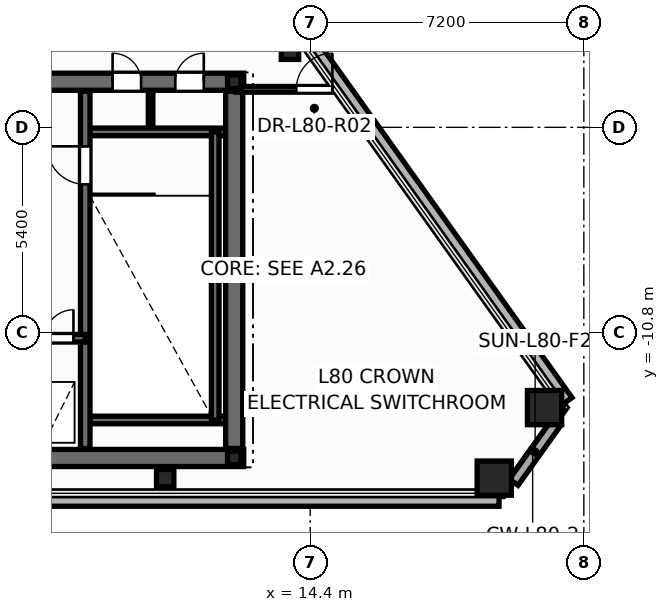
"""IFC4 building model, lengths in metres.
Left out: names, types, materials, properties, quantities, classifications, styles, units other than length and angle.
Written with IfcOpenShell. Run it as: python <this file> out.ifc"""

import sys

from ifc_helpers import new_model, si_unit, direction, frame, frame_2d, origin, origin_2d, place, context, subcontext, project, spatial, rectangle, hollow_rectangle, hollow_circle, i_section, extrude, element, fill, save


model = new_model("IFC4")
c1 = context("Model", 3, precision=1e-05, world=origin(), true_north=direction((0.0, 1.0)))
c2 = subcontext(c1, "Body", "Model", "MODEL_VIEW")
j1 = project(units=[si_unit("LENGTHUNIT", "METRE"), si_unit("PLANEANGLEUNIT", "RADIAN")], contexts=[c1])
p1 = place(None, origin())
s1 = spatial("IfcSite", under=j1, at=p1, CompositionType="ELEMENT")
p2 = place(p1, origin())
s2 = spatial("IfcBuilding", under=s1, at=p2, CompositionType="ELEMENT")
p3 = place(p2, frame((0.0, 0.0, 306.0)))
s3 = spatial("IfcBuildingStorey", under=s2, at=p3, CompositionType="ELEMENT", Elevation=306.0)
p4 = place(p3, frame((19.243, -14.63, 0.0), z_axis=(0.0, 0.0, 1.0), x_axis=(1.0, 0.0, 0.0)))
e1 = element("IfcColumn", 1, at=p4, inside=s3, PredefinedType="COLUMN", context=c2, shape_type="SweptSolid", body=[
    extrude(hollow_rectangle(XDim=0.9, YDim=0.9, WallThickness=0.04, at=origin_2d()), origin(), (0.0, 0.0, 1.0), 3.396),
])
p5 = place(p3, frame((20.567, -12.775, 0.0), z_axis=(0.0, 0.0, 1.0), x_axis=(1.0, 0.0, 0.0)))
e2 = element("IfcColumn", 2, at=p5, inside=s3, PredefinedType="COLUMN", context=c2, shape_type="SweptSolid", body=[
    extrude(hollow_rectangle(XDim=0.9, YDim=0.9, WallThickness=0.04, at=origin_2d()), origin(), (0.0, 0.0, 1.0), 4.2),
])
p6 = place(p3, frame((10.583, -14.63, 0.0), z_axis=(0.0, 0.0, 1.0), x_axis=(1.0, 0.0, 0.0)))
e3 = element("IfcColumn", 3, at=p6, inside=s3, PredefinedType="COLUMN", context=c2, shape_type="SweptSolid", body=[
    extrude(hollow_circle(Radius=0.229, WallThickness=0.016, at=origin_2d()), origin(), (0.0, 0.0, 1.0), 3.396),
])
p7 = place(p3, frame((13.868, -3.385, 0.0), z_axis=(0.0, 0.0, 1.0), x_axis=(1.0, 0.0, 0.0)))
e4 = element("IfcColumn", 4, at=p7, inside=s3, PredefinedType="COLUMN", context=c2, shape_type="SweptSolid", body=[
    extrude(hollow_circle(Radius=0.229, WallThickness=0.016, at=origin_2d()), origin(), (0.0, 0.0, 1.0), 4.2),
])
p8 = place(p3, frame((12.4, -14.1, 0.0), z_axis=(0.0, 0.0, 1.0), x_axis=(1.0, 0.0, 0.0)))
e5 = element("IfcColumn", 5, at=p8, inside=s3, PredefinedType="COLUMN", context=c2, shape_type="SweptSolid", body=[
    extrude(i_section(OverallWidth=0.352, OverallDepth=0.359, WebThickness=0.018, FlangeThickness=0.026, at=origin_2d()), origin(), (0.0, 0.0, 1.0), 3.638),
])
p9 = place(p3, frame((12.4, -4.2, 0.0), z_axis=(0.0, 0.0, 1.0), x_axis=(1.0, 0.0, 0.0)))
e6 = element("IfcColumn", 6, at=p9, inside=s3, PredefinedType="COLUMN", context=c2, shape_type="SweptSolid", body=[
    extrude(i_section(OverallWidth=0.352, OverallDepth=0.359, WebThickness=0.018, FlangeThickness=0.026, at=origin_2d()), origin(), (0.0, 0.0, 1.0), 4.2),
])
p10 = place(p3, frame((-19.369, -15.19, -0.2), z_axis=(0.0, 0.0, 1.0), x_axis=(1.0, 0.0, 0.0)))
e7 = element("IfcWall", 7, at=p10, inside=s3, PredefinedType="PARAPET", context=c2, shape_type="SweptSolid", body=[
    extrude(rectangle(XDim=38.738, YDim=0.36, at=frame_2d((19.369, 0.0))), origin(), (0.0, 0.0, 1.0), 0.38),
])
p11 = place(p3, frame((21.142, -12.617, -0.2), z_axis=(0.0, 0.0, 1.0), x_axis=(-0.580755919834, 0.814077736815, 0.0)))
e8 = element("IfcWall", 8, at=p11, inside=s3, PredefinedType="PARAPET", context=c2, shape_type="SweptSolid", body=[
    extrude(rectangle(XDim=33.288, YDim=0.36, at=frame_2d((16.644, 0.0))), origin(), (0.0, 0.0, 1.0), 0.38),
])
p12 = place(p3, frame((10.2, -5.52, 0.0), z_axis=(0.0, 0.0, 1.0), x_axis=(0.0, 1.0, 0.0)))
e9 = element("IfcWall", 9, at=p12, inside=s3, PredefinedType="PARTITIONING", context=c2, shape_type="SweptSolid", body=[
    extrude(rectangle(XDim=1.12, YDim=0.12, at=frame_2d((0.56, 0.0))), origin(), (0.0, 0.0, 1.0), 3.9),
])
p13 = place(p3, frame((-12.65, -14.1, 0.0), z_axis=(0.0, 0.0, 1.0), x_axis=(1.0, 0.0, 0.0)))
e10 = element("IfcWall", 10, at=p13, inside=s3, PredefinedType="SHEAR", context=c2, shape_type="SweptSolid", body=[
    extrude(rectangle(XDim=25.3, YDim=0.45, at=frame_2d((12.65, 0.0))), origin(), (0.0, 0.0, 1.0), 3.9),
])
p14 = place(p3, frame((-12.65, -4.2, 0.0), z_axis=(0.0, 0.0, 1.0), x_axis=(1.0, 0.0, 0.0)))
e11 = element("IfcWall", 11, at=p14, inside=s3, PredefinedType="SHEAR", context=c2, shape_type="SweptSolid", body=[
    extrude(rectangle(XDim=25.3, YDim=0.45, at=frame_2d((12.65, 0.0))), origin(), (0.0, 0.0, 1.0), 3.9),
])
p15 = place(p14, frame((0.95, 0.0, 0.0)))
e12 = element("IfcOpeningElement", 12, at=p15, cuts=e11, PredefinedType="OPENING", context=c2, shape_type="SweptSolid", body=[
    extrude(rectangle(XDim=0.756, YDim=2.054, at=frame_2d((0.375, 1.027))), frame((0.0, 0.235, 0.0), z_axis=(0.0, -1.0, 0.0), x_axis=(1.0, 0.0, 0.0)), (0.0, 0.0, 1.0), 0.47),
])
p16 = place(p14, frame((2.6, 0.0, 0.0)))
e13 = element("IfcOpeningElement", 13, at=p16, cuts=e11, PredefinedType="OPENING", context=c2, shape_type="SweptSolid", body=[
    extrude(rectangle(XDim=0.756, YDim=2.054, at=frame_2d((0.375, 1.027))), frame((0.0, 0.235, 0.0), z_axis=(0.0, -1.0, 0.0), x_axis=(1.0, 0.0, 0.0)), (0.0, 0.0, 1.0), 0.47),
])
p17 = place(p14, frame((21.85, 0.0, 0.0)))
e14 = element("IfcOpeningElement", 14, at=p17, cuts=e11, PredefinedType="OPENING", context=c2, shape_type="SweptSolid", body=[
    extrude(rectangle(XDim=0.756, YDim=2.054, at=frame_2d((0.375, 1.027))), frame((0.0, 0.235, 0.0), z_axis=(0.0, -1.0, 0.0), x_axis=(1.0, 0.0, 0.0)), (0.0, 0.0, 1.0), 0.47),
])
p18 = place(p14, frame((23.5, 0.0, 0.0)))
e15 = element("IfcOpeningElement", 15, at=p18, cuts=e11, PredefinedType="OPENING", context=c2, shape_type="SweptSolid", body=[
    extrude(rectangle(XDim=0.756, YDim=2.054, at=frame_2d((0.375, 1.027))), frame((0.0, 0.235, 0.0), z_axis=(0.0, -1.0, 0.0), x_axis=(1.0, 0.0, 0.0)), (0.0, 0.0, 1.0), 0.47),
])
p19 = place(p14, frame((5.85, 0.0, 0.0)))
e16 = element("IfcOpeningElement", 16, at=p19, cuts=e11, PredefinedType="OPENING", context=c2, shape_type="SweptSolid", body=[
    extrude(rectangle(XDim=1.006, YDim=2.104, at=frame_2d((0.5, 1.052))), frame((0.0, 0.235, 0.0), z_axis=(0.0, -1.0, 0.0), x_axis=(1.0, 0.0, 0.0)), (0.0, 0.0, 1.0), 0.47),
])
p20 = place(p14, frame((10.35, 0.0, 0.0)))
e17 = element("IfcOpeningElement", 17, at=p20, cuts=e11, PredefinedType="OPENING", context=c2, shape_type="SweptSolid", body=[
    extrude(rectangle(XDim=1.406, YDim=2.154, at=frame_2d((0.7, 1.077))), frame((0.0, 0.235, 0.0), z_axis=(0.0, -1.0, 0.0), x_axis=(1.0, 0.0, 0.0)), (0.0, 0.0, 1.0), 0.47),
])
p21 = place(p14, frame((18.45, 0.0, 0.0)))
e18 = element("IfcOpeningElement", 18, at=p21, cuts=e11, PredefinedType="OPENING", context=c2, shape_type="SweptSolid", body=[
    extrude(rectangle(XDim=1.006, YDim=2.104, at=frame_2d((0.5, 1.052))), frame((0.0, 0.235, 0.0), z_axis=(0.0, -1.0, 0.0), x_axis=(1.0, 0.0, 0.0)), (0.0, 0.0, 1.0), 0.47),
])
for number, where, z_axis, x_axis in (
    (19, (8.48, -5.52, 0.0), (0.0, 0.0, 1.0), (1.0, 0.0, 0.0)),
    (20, (8.48, -13.1, 0.0), (0.0, 0.0, 1.0), (1.0, 0.0, 0.0)),
):
    element("IfcWall", number, at=place(p3, frame(where, z_axis=z_axis, x_axis=x_axis)), inside=s3, PredefinedType="SOLIDWALL", context=c2, shape_type="SweptSolid", body=[
        extrude(rectangle(XDim=3.87, YDim=0.2, at=frame_2d((1.935, 0.0))), origin(), (0.0, 0.0, 1.0), 3.9),
    ])
p22 = place(p3, frame((11.9, -13.1, 0.0), z_axis=(0.0, 0.0, 1.0), x_axis=(0.0, 1.0, 0.0)))
e21 = element("IfcWall", 21, at=p22, inside=s3, PredefinedType="SOLIDWALL", context=c2, shape_type="SweptSolid", body=[
    extrude(rectangle(XDim=7.58, YDim=0.2, at=frame_2d((3.79, 0.0))), origin(), (0.0, 0.0, 1.0), 3.9),
])
p23 = place(p3, frame((8.48, -13.85, 0.0), z_axis=(0.0, 0.0, 1.0), x_axis=(0.0, 1.0, 0.0)))
e22 = element("IfcWall", 22, at=p23, inside=s3, PredefinedType="SHEAR", context=c2, shape_type="SweptSolid", body=[
    extrude(rectangle(XDim=9.4, YDim=0.25, at=frame_2d((4.7, 0.0))), origin(), (0.0, 0.0, 1.0), 3.9),
])
p24 = place(p23, frame((6.95, 0.0, 0.0)))
e23 = element("IfcOpeningElement", 23, at=p24, cuts=e22, PredefinedType="OPENING", context=c2, shape_type="SweptSolid", body=[
    extrude(rectangle(XDim=1.006, YDim=2.104, at=frame_2d((0.5, 1.052))), frame((0.0, 0.135, 0.0), z_axis=(0.0, -1.0, 0.0), x_axis=(1.0, 0.0, 0.0)), (0.0, 0.0, 1.0), 0.27),
])
p25 = place(p3, frame((5.12, -10.95, 0.0), z_axis=(0.0, 0.0, 1.0), x_axis=(1.0, 0.0, 0.0)))
e24 = element("IfcWall", 24, at=p25, inside=s3, PredefinedType="SOLIDWALL", context=c2, shape_type="SweptSolid", body=[
    extrude(rectangle(XDim=3.36, YDim=0.2, at=frame_2d((1.68, 0.0))), origin(), (0.0, 0.0, 1.0), 3.9),
])
p26 = place(p25, frame((0.42, 0.0, 0.0)))
e25 = element("IfcOpeningElement", 25, at=p26, cuts=e24, PredefinedType="OPENING", context=c2, shape_type="SweptSolid", body=[
    extrude(rectangle(XDim=1.106, YDim=2.104, at=frame_2d((0.55, 1.052))), frame((0.0, 0.11, 0.0), z_axis=(0.0, -1.0, 0.0), x_axis=(1.0, 0.0, 0.0)), (0.0, 0.0, 1.0), 0.22),
])
p27 = place(p25, frame((2.3, 0.0, 0.0)))
e26 = element("IfcOpeningElement", 26, at=p27, cuts=e24, PredefinedType="OPENING", context=c2, shape_type="SweptSolid", body=[
    extrude(rectangle(XDim=0.756, YDim=2.054, at=frame_2d((0.375, 1.027))), frame((0.0, 0.11, 0.0), z_axis=(0.0, -1.0, 0.0), x_axis=(1.0, 0.0, 0.0)), (0.0, 0.0, 1.0), 0.22),
])
p28 = place(p3, frame((12.4, -13.85, 0.0), z_axis=(0.0, 0.0, 1.0), x_axis=(0.0, 1.0, 0.0)))
e27 = element("IfcWall", 27, at=p28, inside=s3, PredefinedType="SHEAR", context=c2, shape_type="SweptSolid", body=[
    extrude(rectangle(XDim=9.4, YDim=0.45, at=frame_2d((4.7, 0.0))), origin(), (0.0, 0.0, 1.0), 3.9),
])
p29 = place(p3, frame((12.44, -4.4, 0.0), z_axis=(0.0, 0.0, 1.0), x_axis=(1.0, 0.0, 0.0)))
e28 = element("IfcWall", 28, at=p29, inside=s3, PredefinedType="PARTITIONING", context=c2, shape_type="SweptSolid", body=[
    extrude(rectangle(XDim=2.644, YDim=0.15, at=frame_2d((1.322, 0.0))), origin(), (0.0, 0.0, 1.0), 2.625),
])
p30 = place(p29, frame((1.594, 0.0, 0.0)))
e29 = element("IfcOpeningElement", 29, at=p30, cuts=e28, PredefinedType="OPENING", context=c2, shape_type="SweptSolid", body=[
    extrude(rectangle(XDim=0.956, YDim=2.104, at=frame_2d((0.475, 1.052))), frame((0.0, 0.085, 0.0), z_axis=(0.0, -1.0, 0.0), x_axis=(1.0, 0.0, 0.0)), (0.0, 0.0, 1.0), 0.17),
])
p31 = place(p24, origin())
e30 = element("IfcDoor", 30, at=p31, inside=s3, OperationType="SINGLE_SWING_RIGHT", PredefinedType="DOOR", context=c2, shape_type="SweptSolid", body=[
    extrude(rectangle(XDim=1.0, YDim=2.1, at=frame_2d((0.5, 1.05))), frame((0.0, 0.025, 0.0), z_axis=(0.0, -1.0, 0.0), x_axis=(1.0, 0.0, 0.0)), (0.0, 0.0, 1.0), 0.05),
])
fill(e23, e30)
p32 = place(p27, origin())
e31 = element("IfcDoor", 31, at=p32, inside=s3, OperationType="SINGLE_SWING_RIGHT", PredefinedType="DOOR", context=c2, shape_type="SweptSolid", body=[
    extrude(rectangle(XDim=0.75, YDim=2.05, at=frame_2d((0.375, 1.025))), frame((0.0, 0.025, 0.0), z_axis=(0.0, -1.0, 0.0), x_axis=(1.0, 0.0, 0.0)), (0.0, 0.0, 1.0), 0.05),
])
fill(e26, e31)
p33 = place(p17, origin())
e32 = element("IfcDoor", 32, at=p33, inside=s3, OperationType="SINGLE_SWING_LEFT", PredefinedType="DOOR", context=c2, shape_type="SweptSolid", body=[
    extrude(rectangle(XDim=0.75, YDim=2.05, at=frame_2d((0.375, 1.025))), frame((0.0, 0.025, 0.0), z_axis=(0.0, -1.0, 0.0), x_axis=(1.0, 0.0, 0.0)), (0.0, 0.0, 1.0), 0.05),
])
fill(e14, e32)
p34 = place(p18, origin())
e33 = element("IfcDoor", 33, at=p34, inside=s3, OperationType="SINGLE_SWING_RIGHT", PredefinedType="DOOR", context=c2, shape_type="SweptSolid", body=[
    extrude(rectangle(XDim=0.75, YDim=2.05, at=frame_2d((0.375, 1.025))), frame((0.0, 0.025, 0.0), z_axis=(0.0, -1.0, 0.0), x_axis=(1.0, 0.0, 0.0)), (0.0, 0.0, 1.0), 0.05),
])
fill(e15, e33)
p35 = place(p30, origin())
e34 = element("IfcDoor", 34, at=p35, inside=s3, OperationType="SINGLE_SWING_RIGHT", PredefinedType="DOOR", context=c2, shape_type="SweptSolid", body=[
    extrude(rectangle(XDim=0.95, YDim=2.1, at=frame_2d((0.475, 1.05))), frame((0.0, 0.025, 0.0), z_axis=(0.0, -1.0, 0.0), x_axis=(1.0, 0.0, 0.0)), (0.0, 0.0, 1.0), 0.05),
])
fill(e29, e34)
save(model, sys.argv[1])
